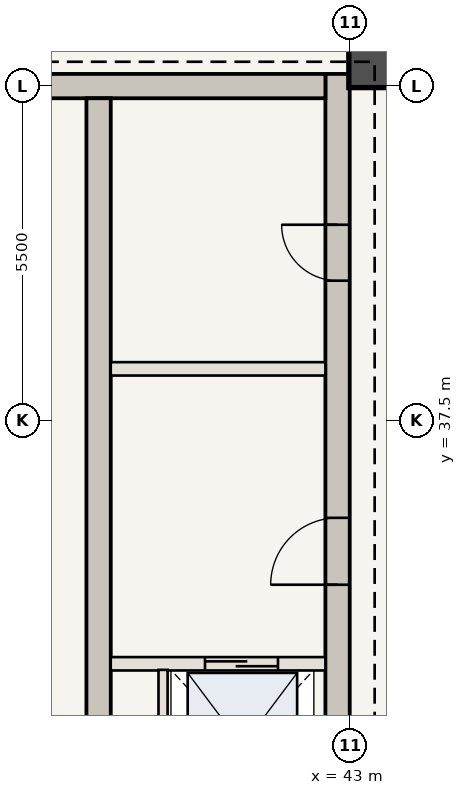
"""IFC4 building model, lengths in metres.
Left out: names, types, materials, properties, quantities, classifications, styles, units other than length and angle.
Written with IfcOpenShell. Run it as: python <this file> out.ifc"""

import sys

from ifc_helpers import new_model, si_unit, direction, frame, frame_2d, origin, origin_2d, place, context, subcontext, project, spatial, rectangle, extrude, element, fill, save


model = new_model("IFC4")
c1 = context("Model", 3, precision=1e-05, world=origin(), true_north=direction((0.0, 1.0)))
c2 = subcontext(c1, "Body", "Model", "MODEL_VIEW")
j1 = project(units=[si_unit("LENGTHUNIT", "METRE"), si_unit("PLANEANGLEUNIT", "RADIAN")], contexts=[c1])
p1 = place(None, origin())
s1 = spatial("IfcSite", under=j1, at=p1, CompositionType="ELEMENT")
p2 = place(p1, origin())
s2 = spatial("IfcBuilding", under=s1, at=p2, CompositionType="ELEMENT")
p3 = place(p2, frame((0.0, 0.0, 292.95)))
s3 = spatial("IfcBuildingStorey", under=s2, at=p3, CompositionType="ELEMENT", Elevation=292.95)
p4 = place(p3, frame((42.79, 30.6, 0.0), z_axis=(0.0, 0.0, 1.0), x_axis=(0.0, 1.0, 0.0)))
e1 = element("IfcWall", 1, at=p4, inside=s3, PredefinedType="SHEAR", context=c2, shape_type="SweptSolid", body=[
    extrude(rectangle(XDim=12.6, YDim=0.4, at=frame_2d((6.3, 0.0))), origin(), (0.0, 0.0, 1.0), 3.85),
])
p5 = place(p4, frame((4.2, 0.0, 0.0)))
e2 = element("IfcOpeningElement", 2, at=p5, cuts=e1, PredefinedType="OPENING", context=c2, shape_type="SweptSolid", body=[
    extrude(rectangle(XDim=1.1, YDim=2.15, at=frame_2d((0.55, 1.075))), frame((0.0, 0.21, 0.0), z_axis=(0.0, -1.0, 0.0), x_axis=(1.0, 0.0, 0.0)), (0.0, 0.0, 1.0), 0.42),
])
p6 = place(p4, frame((9.2, 0.0, 0.0)))
e3 = element("IfcOpeningElement", 3, at=p6, cuts=e1, PredefinedType="OPENING", context=c2, shape_type="SweptSolid", body=[
    extrude(rectangle(XDim=0.92, YDim=2.1, at=frame_2d((0.46, 1.05))), frame((0.0, 0.21, 0.0), z_axis=(0.0, -1.0, 0.0), x_axis=(1.0, 0.0, 0.0)), (0.0, 0.0, 1.0), 0.42),
])
p7 = place(p3, frame((37.75, 43.0, 0.0), z_axis=(0.0, 0.0, 1.0), x_axis=(1.0, 0.0, 0.0)))
e4 = element("IfcWall", 4, at=p7, inside=s3, PredefinedType="SHEAR", context=c2, shape_type="SweptSolid", body=[
    extrude(rectangle(XDim=4.84, YDim=0.4, at=frame_2d((2.42, 0.0))), origin(), (0.0, 0.0, 1.0), 3.85),
])
p8 = place(p3, frame((38.86, 30.6, 0.0), z_axis=(0.0, 0.0, 1.0), x_axis=(0.0, 1.0, 0.0)))
e5 = element("IfcWall", 5, at=p8, inside=s3, PredefinedType="SHEAR", context=c2, shape_type="SweptSolid", body=[
    extrude(rectangle(XDim=12.2, YDim=0.4, at=frame_2d((6.1, 0.0))), origin(), (0.0, 0.0, 1.0), 3.85),
])
p9 = place(p3, frame((43.35, 43.35, 0.0), z_axis=(0.0, 0.0, 1.0), x_axis=(1.0, 0.0, 0.0)))
e6 = element("IfcColumn", 6, at=p9, inside=s3, PredefinedType="COLUMN", context=c2, shape_type="SweptSolid", body=[
    extrude(rectangle(XDim=0.75, YDim=0.75, at=origin_2d()), origin(), (0.0, 0.0, 1.0), 3.85),
])
p10 = place(p3, frame((39.06, 33.5, 0.0), z_axis=(0.0, 0.0, 1.0), x_axis=(1.0, 0.0, 0.0)))
e7 = element("IfcWall", 7, at=p10, inside=s3, PredefinedType="STANDARD", context=c2, shape_type="SweptSolid", body=[
    extrude(rectangle(XDim=3.53, YDim=0.22, at=frame_2d((1.765, 0.0))), origin(), (0.0, 0.0, 1.0), 3.685),
])
p11 = place(p10, frame((1.55, 0.0, 0.0)))
e8 = element("IfcOpeningElement", 8, at=p11, cuts=e7, PredefinedType="OPENING", context=c2, shape_type="SweptSolid", body=[
    extrude(rectangle(XDim=1.2, YDim=2.2, at=frame_2d((0.6, 1.1))), frame((0.0, 0.12, 0.0), z_axis=(0.0, -1.0, 0.0), x_axis=(1.0, 0.0, 0.0)), (0.0, 0.0, 1.0), 0.24),
])
p12 = place(p3, frame((39.92, 30.75, 0.0), z_axis=(0.0, 0.0, 1.0), x_axis=(0.0, 1.0, 0.0)))
e9 = element("IfcWall", 9, at=p12, inside=s3, PredefinedType="STANDARD", context=c2, shape_type="SweptSolid", body=[
    extrude(rectangle(XDim=2.65, YDim=0.15, at=frame_2d((1.325, 0.0))), origin(), (0.0, 0.0, 1.0), 3.685),
])
p13 = place(p3, frame((39.06, 38.35, 0.0), z_axis=(0.0, 0.0, 1.0), x_axis=(1.0, 0.0, 0.0)))
e10 = element("IfcWall", 10, at=p13, inside=s3, PredefinedType="STANDARD", context=c2, shape_type="SweptSolid", body=[
    extrude(rectangle(XDim=3.53, YDim=0.22, at=frame_2d((1.765, 0.0))), origin(), (0.0, 0.0, 1.0), 3.685),
])
p14 = place(p5, origin())
e11 = element("IfcDoor", 11, at=p14, inside=s3, OperationType="SINGLE_SWING_LEFT", PredefinedType="DOOR", context=c2, shape_type="SweptSolid", body=[
    extrude(rectangle(XDim=1.1, YDim=2.15, at=frame_2d((0.55, 1.075))), frame((0.0, 0.025, 0.0), z_axis=(0.0, -1.0, 0.0), x_axis=(1.0, 0.0, 0.0)), (0.0, 0.0, 1.0), 0.05),
])
fill(e2, e11)
p15 = place(p6, origin())
e12 = element("IfcDoor", 12, at=p15, inside=s3, OperationType="SINGLE_SWING_RIGHT", PredefinedType="DOOR", context=c2, shape_type="SweptSolid", body=[
    extrude(rectangle(XDim=0.92, YDim=2.1, at=frame_2d((0.46, 1.05))), frame((0.0, 0.025, 0.0), z_axis=(0.0, -1.0, 0.0), x_axis=(1.0, 0.0, 0.0)), (0.0, 0.0, 1.0), 0.05),
])
fill(e3, e12)
p16 = place(p11, origin())
e13 = element("IfcDoor", 13, at=p16, inside=s3, OperationType="DOUBLE_DOOR_SLIDING", PredefinedType="DOOR", context=c2, shape_type="SweptSolid", body=[
    extrude(rectangle(XDim=1.2, YDim=2.2, at=frame_2d((0.6, 1.1))), frame((0.0, 0.025, 0.0), z_axis=(0.0, -1.0, 0.0), x_axis=(1.0, 0.0, 0.0)), (0.0, 0.0, 1.0), 0.05),
])
fill(e8, e13)
save(model, sys.argv[1])
